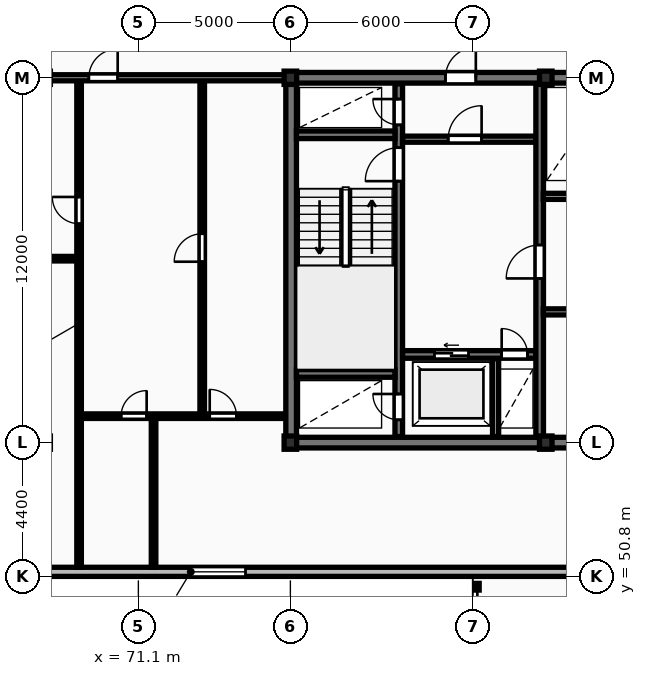
"""IFC4 building model, lengths in metres.
Left out: names, types, materials, properties, quantities, classifications, styles, units other than length and angle.
Written with IfcOpenShell. Run it as: python <this file> out.ifc"""

import sys

from ifc_helpers import new_model, si_unit, direction, frame, frame_2d, origin, origin_2d, place, context, subcontext, project, spatial, rectangle, i_section, extrude, element, fill, save


model = new_model("IFC4")
c1 = context("Model", 3, precision=1e-05, world=origin(), true_north=direction((0.0, 1.0)))
c2 = subcontext(c1, "Body", "Model", "MODEL_VIEW")
j1 = project(units=[si_unit("LENGTHUNIT", "METRE"), si_unit("PLANEANGLEUNIT", "RADIAN")], contexts=[c1])
p1 = place(None, origin())
s1 = spatial("IfcSite", under=j1, at=p1, CompositionType="ELEMENT")
p2 = place(p1, origin())
s2 = spatial("IfcBuilding", under=s1, at=p2, CompositionType="ELEMENT")
p3 = place(p2, frame((0.0, 0.0, 139.3)))
s3 = spatial("IfcBuildingStorey", under=s2, at=p3, CompositionType="ELEMENT", Elevation=139.3)
for number, where, z_axis, x_axis in (
    (1, (76.1, 55.2, 0.0), (0.0, 0.0, 1.0), (1.0, 0.0, 0.0)),
    (2, (76.1, 67.2, 0.0), (0.0, 0.0, 1.0), (1.0, 0.0, 0.0)),
    (3, (84.5, 55.2, 0.0), (0.0, 0.0, 1.0), (1.0, 0.0, 0.0)),
    (4, (84.5, 67.2, 0.0), (0.0, 0.0, 1.0), (1.0, 0.0, 0.0)),
):
    element("IfcColumn", number, at=place(p3, frame(where, z_axis=z_axis, x_axis=x_axis)), inside=s3, PredefinedType="COLUMN", context=c2, shape_type="SweptSolid", body=[
        extrude(i_section(OverallWidth=0.412, OverallDepth=0.437, WebThickness=0.036, FlangeThickness=0.052, FilletRadius=0.015, at=origin_2d()), origin(), (0.0, 0.0, 1.0), 3.6),
    ])
p4 = place(p3, frame((57.6, 50.95, 0.0), z_axis=(0.0, 0.0, 1.0), x_axis=(1.0, 0.0, 0.0)))
e5 = element("IfcWall", 5, at=p4, inside=s3, PredefinedType="STANDARD", context=c2, shape_type="SweptSolid", body=[
    extrude(rectangle(XDim=73.0, YDim=0.3, at=frame_2d((36.5, 0.0))), origin(), (0.0, 0.0, 1.0), 3.31),
])
p5 = place(p4, frame((15.225, 0.0, 0.85)))
e6 = element("IfcOpeningElement", 6, at=p5, cuts=e5, PredefinedType="OPENING", context=c2, shape_type="SweptSolid", body=[
    extrude(rectangle(XDim=1.8, YDim=1.8, at=frame_2d((0.9, 0.9))), frame((0.0, 0.16, 0.0), z_axis=(0.0, -1.0, 0.0), x_axis=(1.0, 0.0, 0.0)), (0.0, 0.0, 1.0), 0.32),
])
p6 = place(p4, frame((58.575, 0.0, 0.85)))
e7 = element("IfcOpeningElement", 7, at=p6, cuts=e5, PredefinedType="OPENING", context=c2, shape_type="SweptSolid", body=[
    extrude(rectangle(XDim=1.8, YDim=1.8, at=frame_2d((0.9, 0.9))), frame((0.0, 0.16, 0.0), z_axis=(0.0, -1.0, 0.0), x_axis=(1.0, 0.0, 0.0)), (0.0, 0.0, 1.0), 0.32),
])
p7 = place(p4, frame((33.45, 0.0, 0.0)))
e8 = element("IfcOpeningElement", 8, at=p7, cuts=e5, PredefinedType="OPENING", context=c2, shape_type="SweptSolid", body=[
    extrude(rectangle(XDim=1.1, YDim=2.1, at=frame_2d((0.55, 1.05))), frame((0.0, 0.16, 0.0), z_axis=(0.0, -1.0, 0.0), x_axis=(1.0, 0.0, 0.0)), (0.0, 0.0, 1.0), 0.32),
])
p8 = place(p3, frame((75.95, 55.2, 0.0), z_axis=(0.0, 0.0, 1.0), x_axis=(1.0, 0.0, 0.0)))
e9 = element("IfcWall", 9, at=p8, inside=s3, PredefinedType="SHEAR", context=c2, shape_type="SweptSolid", body=[
    extrude(rectangle(XDim=36.3, YDim=0.35, at=frame_2d((18.15, 0.0))), origin(), (0.0, 0.0, 1.0), 3.6),
])
p9 = place(p8, frame((15.1, 0.0, 0.0)))
e10 = element("IfcOpeningElement", 10, at=p9, cuts=e9, PredefinedType="OPENING", context=c2, shape_type="SweptSolid", body=[
    extrude(rectangle(XDim=1.1, YDim=2.1, at=frame_2d((0.55, 1.05))), frame((0.0, 0.185, 0.0), z_axis=(0.0, -1.0, 0.0), x_axis=(1.0, 0.0, 0.0)), (0.0, 0.0, 1.0), 0.37),
])
p10 = place(p3, frame((76.125, 55.375, 0.0), z_axis=(0.0, 0.0, 1.0), x_axis=(0.0, 1.0, 0.0)))
e11 = element("IfcWall", 11, at=p10, inside=s3, PredefinedType="SHEAR", context=c2, shape_type="SweptSolid", body=[
    extrude(rectangle(XDim=11.65, YDim=0.35, at=frame_2d((5.825, 0.0))), origin(), (0.0, 0.0, 1.0), 3.6),
])
p11 = place(p3, frame((75.95, 67.2, 0.0), z_axis=(0.0, 0.0, 1.0), x_axis=(1.0, 0.0, 0.0)))
e12 = element("IfcWall", 12, at=p11, inside=s3, PredefinedType="SHEAR", context=c2, shape_type="SweptSolid", body=[
    extrude(rectangle(XDim=36.3, YDim=0.35, at=frame_2d((18.15, 0.0))), origin(), (0.0, 0.0, 1.0), 3.6),
])
p12 = place(p11, frame((5.25, 0.0, 0.0)))
e13 = element("IfcOpeningElement", 13, at=p12, cuts=e12, PredefinedType="OPENING", context=c2, shape_type="SweptSolid", body=[
    extrude(rectangle(XDim=1.0, YDim=2.15, at=frame_2d((0.5, 1.075))), frame((0.0, 0.185, 0.0), z_axis=(0.0, -1.0, 0.0), x_axis=(1.0, 0.0, 0.0)), (0.0, 0.0, 1.0), 0.37),
])
p13 = place(p11, frame((21.6, 0.0, 0.0)))
e14 = element("IfcOpeningElement", 14, at=p13, cuts=e12, PredefinedType="OPENING", context=c2, shape_type="SweptSolid", body=[
    extrude(rectangle(XDim=1.5, YDim=2.2, at=frame_2d((0.75, 1.1))), frame((0.0, 0.185, 0.0), z_axis=(0.0, -1.0, 0.0), x_axis=(1.0, 0.0, 0.0)), (0.0, 0.0, 1.0), 0.37),
])
p14 = place(p11, frame((30.45, 0.0, 0.0)))
e15 = element("IfcOpeningElement", 15, at=p14, cuts=e12, PredefinedType="OPENING", context=c2, shape_type="SweptSolid", body=[
    extrude(rectangle(XDim=1.0, YDim=2.15, at=frame_2d((0.5, 1.075))), frame((0.0, 0.185, 0.0), z_axis=(0.0, -1.0, 0.0), x_axis=(1.0, 0.0, 0.0)), (0.0, 0.0, 1.0), 0.37),
])
p15 = place(p3, frame((79.665, 55.4, 0.0), z_axis=(0.0, 0.0, 1.0), x_axis=(0.0, 1.0, 0.0)))
e16 = element("IfcWall", 16, at=p15, inside=s3, PredefinedType="SHEAR", context=c2, shape_type="SweptSolid", body=[
    extrude(rectangle(XDim=11.6, YDim=0.25, at=frame_2d((5.8, 0.0))), origin(), (0.0, 0.0, 1.0), 3.6),
])
p16 = place(p15, frame((0.55, 0.0, 0.0)))
e17 = element("IfcOpeningElement", 17, at=p16, cuts=e16, PredefinedType="OPENING", context=c2, shape_type="SweptSolid", body=[
    extrude(rectangle(XDim=0.85, YDim=2.05, at=frame_2d((0.425, 1.025))), frame((0.0, 0.135, 0.0), z_axis=(0.0, -1.0, 0.0), x_axis=(1.0, 0.0, 0.0)), (0.0, 0.0, 1.0), 0.27),
])
p17 = place(p15, frame((8.4, 0.0, 0.0)))
e18 = element("IfcOpeningElement", 18, at=p17, cuts=e16, PredefinedType="OPENING", context=c2, shape_type="SweptSolid", body=[
    extrude(rectangle(XDim=1.1, YDim=2.1, at=frame_2d((0.55, 1.05))), frame((0.0, 0.135, 0.0), z_axis=(0.0, -1.0, 0.0), x_axis=(1.0, 0.0, 0.0)), (0.0, 0.0, 1.0), 0.27),
])
p18 = place(p15, frame((10.25, 0.0, 0.0)))
e19 = element("IfcOpeningElement", 19, at=p18, cuts=e16, PredefinedType="OPENING", context=c2, shape_type="SweptSolid", body=[
    extrude(rectangle(XDim=0.85, YDim=2.05, at=frame_2d((0.425, 1.025))), frame((0.0, 0.135, 0.0), z_axis=(0.0, -1.0, 0.0), x_axis=(1.0, 0.0, 0.0)), (0.0, 0.0, 1.0), 0.27),
])
for number, where, z_axis, x_axis in (
    (20, (76.3, 57.475, 0.0), (0.0, 0.0, 1.0), (1.0, 0.0, 0.0)),
    (21, (76.3, 65.325, 0.0), (0.0, 0.0, 1.0), (1.0, 0.0, 0.0)),
):
    element("IfcWall", number, at=place(p3, frame(where, z_axis=z_axis, x_axis=x_axis)), inside=s3, PredefinedType="SHEAR", context=c2, shape_type="SweptSolid", body=[
        extrude(rectangle(XDim=3.24, YDim=0.25, at=frame_2d((1.62, 0.0))), origin(), (0.0, 0.0, 1.0), 3.6),
    ])
p19 = place(p3, frame((79.79, 58.1, 0.0), z_axis=(0.0, 0.0, 1.0), x_axis=(1.0, 0.0, 0.0)))
e22 = element("IfcWall", 22, at=p19, inside=s3, PredefinedType="SHEAR", context=c2, shape_type="SweptSolid", body=[
    extrude(rectangle(XDim=4.39, YDim=0.25, at=frame_2d((2.195, 0.0))), origin(), (0.0, 0.0, 1.0), 3.6),
])
p20 = place(p19, frame((1.05, 0.0, 0.0)))
e23 = element("IfcOpeningElement", 23, at=p20, cuts=e22, PredefinedType="OPENING", context=c2, shape_type="SweptSolid", body=[
    extrude(rectangle(XDim=1.12, YDim=2.12, at=frame_2d((0.56, 1.06))), frame((0.0, 0.135, 0.0), z_axis=(0.0, -1.0, 0.0), x_axis=(1.0, 0.0, 0.0)), (0.0, 0.0, 1.0), 0.27),
])
p21 = place(p19, frame((3.26, 0.0, 0.0)))
e24 = element("IfcOpeningElement", 24, at=p21, cuts=e22, PredefinedType="OPENING", context=c2, shape_type="SweptSolid", body=[
    extrude(rectangle(XDim=0.85, YDim=2.05, at=frame_2d((0.425, 1.025))), frame((0.0, 0.135, 0.0), z_axis=(0.0, -1.0, 0.0), x_axis=(1.0, 0.0, 0.0)), (0.0, 0.0, 1.0), 0.27),
])
p22 = place(p3, frame((82.85, 55.4, 0.0), z_axis=(0.0, 0.0, 1.0), x_axis=(0.0, 1.0, 0.0)))
e25 = element("IfcWall", 25, at=p22, inside=s3, PredefinedType="PARTITIONING", context=c2, shape_type="SweptSolid", body=[
    extrude(rectangle(XDim=2.56, YDim=0.2, at=frame_2d((1.28, 0.0))), origin(), (0.0, 0.0, 1.0), 3.31),
])
p23 = place(p3, frame((79.79, 65.18, 0.0), z_axis=(0.0, 0.0, 1.0), x_axis=(1.0, 0.0, 0.0)))
e26 = element("IfcWall", 26, at=p23, inside=s3, PredefinedType="PARTITIONING", context=c2, shape_type="SweptSolid", body=[
    extrude(rectangle(XDim=4.39, YDim=0.2, at=frame_2d((2.195, 0.0))), origin(), (0.0, 0.0, 1.0), 3.31),
])
p24 = place(p23, frame((1.5, 0.0, 0.0)))
e27 = element("IfcOpeningElement", 27, at=p24, cuts=e26, PredefinedType="OPENING", context=c2, shape_type="SweptSolid", body=[
    extrude(rectangle(XDim=1.1, YDim=2.1, at=frame_2d((0.55, 1.05))), frame((0.0, 0.11, 0.0), z_axis=(0.0, -1.0, 0.0), x_axis=(1.0, 0.0, 0.0)), (0.0, 0.0, 1.0), 0.22),
])
p25 = place(p3, frame((84.3, 55.4, 0.0), z_axis=(0.0, 0.0, 1.0), x_axis=(0.0, 1.0, 0.0)))
e28 = element("IfcWall", 28, at=p25, inside=s3, PredefinedType="SHEAR", context=c2, shape_type="SweptSolid", body=[
    extrude(rectangle(XDim=11.6, YDim=0.25, at=frame_2d((5.8, 0.0))), origin(), (0.0, 0.0, 1.0), 3.6),
])
p26 = place(p25, frame((5.2, 0.0, 0.0)))
e29 = element("IfcOpeningElement", 29, at=p26, cuts=e28, PredefinedType="OPENING", context=c2, shape_type="SweptSolid", body=[
    extrude(rectangle(XDim=1.1, YDim=2.1, at=frame_2d((0.55, 1.05))), frame((0.0, 0.135, 0.0), z_axis=(0.0, -1.0, 0.0), x_axis=(1.0, 0.0, 0.0)), (0.0, 0.0, 1.0), 0.27),
])
p27 = place(p3, frame((84.42, 59.5, 0.0), z_axis=(0.0, 0.0, 1.0), x_axis=(1.0, 0.0, 0.0)))
e30 = element("IfcWall", 30, at=p27, inside=s3, PredefinedType="PARTITIONING", context=c2, shape_type="SweptSolid", body=[
    extrude(rectangle(XDim=8.36, YDim=0.2, at=frame_2d((4.18, 0.0))), origin(), (0.0, 0.0, 1.0), 3.31),
])
p28 = place(p27, frame((2.1, 0.0, 0.0)))
e31 = element("IfcOpeningElement", 31, at=p28, cuts=e30, PredefinedType="OPENING", context=c2, shape_type="SweptSolid", body=[
    extrude(rectangle(XDim=0.92, YDim=2.08, at=frame_2d((0.46, 1.04))), frame((0.0, 0.11, 0.0), z_axis=(0.0, -1.0, 0.0), x_axis=(1.0, 0.0, 0.0)), (0.0, 0.0, 1.0), 0.22),
])
p29 = place(p27, frame((6.38, 0.0, 0.0)))
e32 = element("IfcOpeningElement", 32, at=p29, cuts=e30, PredefinedType="OPENING", context=c2, shape_type="SweptSolid", body=[
    extrude(rectangle(XDim=1.1, YDim=2.1, at=frame_2d((0.55, 1.05))), frame((0.0, 0.11, 0.0), z_axis=(0.0, -1.0, 0.0), x_axis=(1.0, 0.0, 0.0)), (0.0, 0.0, 1.0), 0.22),
])
p30 = place(p3, frame((84.42, 63.3, 0.0), z_axis=(0.0, 0.0, 1.0), x_axis=(1.0, 0.0, 0.0)))
e33 = element("IfcWall", 33, at=p30, inside=s3, PredefinedType="PARTITIONING", context=c2, shape_type="SweptSolid", body=[
    extrude(rectangle(XDim=19.83, YDim=0.2, at=frame_2d((9.915, 0.0))), origin(), (0.0, 0.0, 1.0), 3.31),
])
p31 = place(p30, frame((1.15, 0.0, 0.0)))
e34 = element("IfcOpeningElement", 34, at=p31, cuts=e33, PredefinedType="OPENING", context=c2, shape_type="SweptSolid", body=[
    extrude(rectangle(XDim=0.85, YDim=2.05, at=frame_2d((0.425, 1.025))), frame((0.0, 0.11, 0.0), z_axis=(0.0, -1.0, 0.0), x_axis=(1.0, 0.0, 0.0)), (0.0, 0.0, 1.0), 0.22),
])
p32 = place(p30, frame((3.25, 0.0, 0.0)))
e35 = element("IfcOpeningElement", 35, at=p32, cuts=e33, PredefinedType="OPENING", context=c2, shape_type="SweptSolid", body=[
    extrude(rectangle(XDim=0.85, YDim=2.05, at=frame_2d((0.425, 1.025))), frame((0.0, 0.11, 0.0), z_axis=(0.0, -1.0, 0.0), x_axis=(1.0, 0.0, 0.0)), (0.0, 0.0, 1.0), 0.22),
])
p33 = place(p30, frame((13.08, 0.0, 0.0)))
e36 = element("IfcOpeningElement", 36, at=p33, cuts=e33, PredefinedType="OPENING", context=c2, shape_type="SweptSolid", body=[
    extrude(rectangle(XDim=1.5, YDim=2.2, at=frame_2d((0.75, 1.1))), frame((0.0, 0.11, 0.0), z_axis=(0.0, -1.0, 0.0), x_axis=(1.0, 0.0, 0.0)), (0.0, 0.0, 1.0), 0.22),
])
p34 = place(p30, frame((5.53, 0.0, 0.0)))
e37 = element("IfcOpeningElement", 37, at=p34, cuts=e33, PredefinedType="OPENING", context=c2, shape_type="SweptSolid", body=[
    extrude(rectangle(XDim=0.88, YDim=2.06, at=frame_2d((0.44, 1.03))), frame((0.0, 0.11, 0.0), z_axis=(0.0, -1.0, 0.0), x_axis=(1.0, 0.0, 0.0)), (0.0, 0.0, 1.0), 0.22),
])
p35 = place(p30, frame((7.68, 0.0, 0.0)))
e38 = element("IfcOpeningElement", 38, at=p35, cuts=e33, PredefinedType="OPENING", context=c2, shape_type="SweptSolid", body=[
    extrude(rectangle(XDim=0.88, YDim=2.06, at=frame_2d((0.44, 1.03))), frame((0.0, 0.11, 0.0), z_axis=(0.0, -1.0, 0.0), x_axis=(1.0, 0.0, 0.0)), (0.0, 0.0, 1.0), 0.22),
])
p36 = place(p30, frame((10.43, 0.0, 0.0)))
e39 = element("IfcOpeningElement", 39, at=p36, cuts=e33, PredefinedType="OPENING", context=c2, shape_type="SweptSolid", body=[
    extrude(rectangle(XDim=0.85, YDim=2.05, at=frame_2d((0.425, 1.025))), frame((0.0, 0.11, 0.0), z_axis=(0.0, -1.0, 0.0), x_axis=(1.0, 0.0, 0.0)), (0.0, 0.0, 1.0), 0.22),
])
p37 = place(p30, frame((16.23, 0.0, 0.0)))
e40 = element("IfcOpeningElement", 40, at=p37, cuts=e33, PredefinedType="OPENING", context=c2, shape_type="SweptSolid", body=[
    extrude(rectangle(XDim=0.96, YDim=2.1, at=frame_2d((0.48, 1.05))), frame((0.0, 0.11, 0.0), z_axis=(0.0, -1.0, 0.0), x_axis=(1.0, 0.0, 0.0)), (0.0, 0.0, 1.0), 0.22),
])
p38 = place(p30, frame((18.68, 0.0, 0.0)))
e41 = element("IfcOpeningElement", 41, at=p38, cuts=e33, PredefinedType="OPENING", context=c2, shape_type="SweptSolid", body=[
    extrude(rectangle(XDim=0.84, YDim=2.04, at=frame_2d((0.42, 1.02))), frame((0.0, 0.11, 0.0), z_axis=(0.0, -1.0, 0.0), x_axis=(1.0, 0.0, 0.0)), (0.0, 0.0, 1.0), 0.22),
])
p39 = place(p3, frame((57.6, 61.25, 0.0), z_axis=(0.0, 0.0, 1.0), x_axis=(1.0, 0.0, 0.0)))
e42 = element("IfcWall", 42, at=p39, inside=s3, PredefinedType="PARTITIONING", context=c2, shape_type="SweptSolid", body=[
    extrude(rectangle(XDim=11.55, YDim=0.15, at=frame_2d((5.775, 0.0))), origin(), (0.0, 0.0, 1.0), 3.31),
])
p40 = place(p39, frame((5.355, 0.0, 0.0)))
e43 = element("IfcOpeningElement", 43, at=p40, cuts=e42, PredefinedType="OPENING", context=c2, shape_type="SweptSolid", body=[
    extrude(rectangle(XDim=0.84, YDim=2.04, at=frame_2d((0.42, 1.02))), frame((0.0, 0.085, 0.0), z_axis=(0.0, -1.0, 0.0), x_axis=(1.0, 0.0, 0.0)), (0.0, 0.0, 1.0), 0.17),
])
p41 = place(p3, frame((69.15, 51.1, 0.0), z_axis=(0.0, 0.0, 1.0), x_axis=(0.0, 1.0, 0.0)))
e44 = element("IfcWall", 44, at=p41, inside=s3, PredefinedType="PARTITIONING", context=c2, shape_type="SweptSolid", body=[
    extrude(rectangle(XDim=16.05, YDim=0.15, at=frame_2d((8.025, 0.0))), origin(), (0.0, 0.0, 1.0), 3.31),
])
p42 = place(p41, frame((11.3, 0.0, 0.0)))
e45 = element("IfcOpeningElement", 45, at=p42, cuts=e44, PredefinedType="OPENING", context=c2, shape_type="SweptSolid", body=[
    extrude(rectangle(XDim=0.88, YDim=2.06, at=frame_2d((0.44, 1.03))), frame((0.0, 0.085, 0.0), z_axis=(0.0, -1.0, 0.0), x_axis=(1.0, 0.0, 0.0)), (0.0, 0.0, 1.0), 0.17),
])
p43 = place(p3, frame((73.2, 56.07, 0.0), z_axis=(0.0, 0.0, 1.0), x_axis=(0.0, 1.0, 0.0)))
e46 = element("IfcWall", 46, at=p43, inside=s3, PredefinedType="PARTITIONING", context=c2, shape_type="SweptSolid", body=[
    extrude(rectangle(XDim=11.08, YDim=0.15, at=frame_2d((5.54, 0.0))), origin(), (0.0, 0.0, 1.0), 3.31),
])
p44 = place(p43, frame((5.08, 0.0, 0.0)))
e47 = element("IfcOpeningElement", 47, at=p44, cuts=e46, PredefinedType="OPENING", context=c2, shape_type="SweptSolid", body=[
    extrude(rectangle(XDim=0.92, YDim=2.08, at=frame_2d((0.46, 1.04))), frame((0.0, 0.085, 0.0), z_axis=(0.0, -1.0, 0.0), x_axis=(1.0, 0.0, 0.0)), (0.0, 0.0, 1.0), 0.17),
])
p45 = place(p3, frame((71.6, 51.1, 0.0), z_axis=(0.0, 0.0, 1.0), x_axis=(0.0, 1.0, 0.0)))
e48 = element("IfcWall", 48, at=p45, inside=s3, PredefinedType="PARTITIONING", context=c2, shape_type="SweptSolid", body=[
    extrude(rectangle(XDim=4.97, YDim=0.15, at=frame_2d((2.485, 0.0))), origin(), (0.0, 0.0, 1.0), 3.31),
])
p46 = place(p3, frame((69.17, 56.07, 0.0), z_axis=(0.0, 0.0, 1.0), x_axis=(1.0, 0.0, 0.0)))
e49 = element("IfcWall", 49, at=p46, inside=s3, PredefinedType="PARTITIONING", context=c2, shape_type="SweptSolid", body=[
    extrude(rectangle(XDim=6.76, YDim=0.15, at=frame_2d((3.38, 0.0))), origin(), (0.0, 0.0, 1.0), 3.31),
])
p47 = place(p46, frame((1.362, 0.0, 0.0)))
e50 = element("IfcOpeningElement", 50, at=p47, cuts=e49, PredefinedType="OPENING", context=c2, shape_type="SweptSolid", body=[
    extrude(rectangle(XDim=0.84, YDim=2.04, at=frame_2d((0.42, 1.02))), frame((0.0, 0.085, 0.0), z_axis=(0.0, -1.0, 0.0), x_axis=(1.0, 0.0, 0.0)), (0.0, 0.0, 1.0), 0.17),
])
p48 = place(p46, frame((4.277, 0.0, 0.0)))
e51 = element("IfcOpeningElement", 51, at=p48, cuts=e49, PredefinedType="OPENING", context=c2, shape_type="SweptSolid", body=[
    extrude(rectangle(XDim=0.88, YDim=2.06, at=frame_2d((0.44, 1.03))), frame((0.0, 0.085, 0.0), z_axis=(0.0, -1.0, 0.0), x_axis=(1.0, 0.0, 0.0)), (0.0, 0.0, 1.0), 0.17),
])
p49 = place(p3, frame((57.6, 67.2, 0.0), z_axis=(0.0, 0.0, 1.0), x_axis=(1.0, 0.0, 0.0)))
e52 = element("IfcWall", 52, at=p49, inside=s3, PredefinedType="PARTITIONING", context=c2, shape_type="SweptSolid", body=[
    extrude(rectangle(XDim=18.35, YDim=0.2, at=frame_2d((9.175, 0.0))), origin(), (0.0, 0.0, 1.0), 2.773),
])
p50 = place(p49, frame((11.87, 0.0, 0.0)))
e53 = element("IfcOpeningElement", 53, at=p50, cuts=e52, PredefinedType="OPENING", context=c2, shape_type="SweptSolid", body=[
    extrude(rectangle(XDim=0.95, YDim=2.15, at=frame_2d((0.475, 1.075))), frame((0.0, 0.11, 0.0), z_axis=(0.0, -1.0, 0.0), x_axis=(1.0, 0.0, 0.0)), (0.0, 0.0, 1.0), 0.22),
])
p51 = place(p5, origin())
e54 = element("IfcWindow", 54, at=p51, inside=s3, PartitioningType="SINGLE_PANEL", PredefinedType="WINDOW", context=c2, shape_type="SweptSolid", body=[
    extrude(rectangle(XDim=1.8, YDim=1.8, at=frame_2d((0.9, 0.9))), frame((0.0, 0.03, 0.0), z_axis=(0.0, -1.0, 0.0), x_axis=(1.0, 0.0, 0.0)), (0.0, 0.0, 1.0), 0.06),
])
fill(e6, e54)
p52 = place(p12, origin())
e55 = element("IfcDoor", 55, at=p52, inside=s3, OperationType="SINGLE_SWING_RIGHT", PredefinedType="DOOR", context=c2, shape_type="SweptSolid", body=[
    extrude(rectangle(XDim=1.0, YDim=2.15, at=frame_2d((0.5, 1.075))), frame((0.0, 0.025, 0.0), z_axis=(0.0, -1.0, 0.0), x_axis=(1.0, 0.0, 0.0)), (0.0, 0.0, 1.0), 0.05),
])
fill(e13, e55)
p53 = place(p16, origin())
e56 = element("IfcDoor", 56, at=p53, inside=s3, OperationType="SINGLE_SWING_RIGHT", PredefinedType="DOOR", context=c2, shape_type="SweptSolid", body=[
    extrude(rectangle(XDim=0.85, YDim=2.05, at=frame_2d((0.425, 1.025))), frame((0.0, 0.025, 0.0), z_axis=(0.0, -1.0, 0.0), x_axis=(1.0, 0.0, 0.0)), (0.0, 0.0, 1.0), 0.05),
])
fill(e17, e56)
p54 = place(p17, origin())
e57 = element("IfcDoor", 57, at=p54, inside=s3, OperationType="SINGLE_SWING_LEFT", PredefinedType="DOOR", context=c2, shape_type="SweptSolid", body=[
    extrude(rectangle(XDim=1.1, YDim=2.1, at=frame_2d((0.55, 1.05))), frame((0.0, 0.025, 0.0), z_axis=(0.0, -1.0, 0.0), x_axis=(1.0, 0.0, 0.0)), (0.0, 0.0, 1.0), 0.05),
])
fill(e18, e57)
p55 = place(p18, origin())
e58 = element("IfcDoor", 58, at=p55, inside=s3, OperationType="SINGLE_SWING_RIGHT", PredefinedType="DOOR", context=c2, shape_type="SweptSolid", body=[
    extrude(rectangle(XDim=0.85, YDim=2.05, at=frame_2d((0.425, 1.025))), frame((0.0, 0.025, 0.0), z_axis=(0.0, -1.0, 0.0), x_axis=(1.0, 0.0, 0.0)), (0.0, 0.0, 1.0), 0.05),
])
fill(e19, e58)
p56 = place(p20, origin())
e59 = element("IfcDoor", 59, at=p56, inside=s3, OperationType="SLIDING_TO_LEFT", PredefinedType="DOOR", context=c2, shape_type="SweptSolid", body=[
    extrude(rectangle(XDim=1.12, YDim=2.12, at=frame_2d((0.56, 1.06))), frame((0.0, 0.025, 0.0), z_axis=(0.0, -1.0, 0.0), x_axis=(1.0, 0.0, 0.0)), (0.0, 0.0, 1.0), 0.05),
])
fill(e23, e59)
p57 = place(p21, origin())
e60 = element("IfcDoor", 60, at=p57, inside=s3, OperationType="SINGLE_SWING_LEFT", PredefinedType="DOOR", context=c2, shape_type="SweptSolid", body=[
    extrude(rectangle(XDim=0.85, YDim=2.05, at=frame_2d((0.425, 1.025))), frame((0.0, 0.025, 0.0), z_axis=(0.0, -1.0, 0.0), x_axis=(1.0, 0.0, 0.0)), (0.0, 0.0, 1.0), 0.05),
])
fill(e24, e60)
p58 = place(p24, origin())
e61 = element("IfcDoor", 61, at=p58, inside=s3, OperationType="SINGLE_SWING_RIGHT", PredefinedType="DOOR", context=c2, shape_type="SweptSolid", body=[
    extrude(rectangle(XDim=1.1, YDim=2.1, at=frame_2d((0.55, 1.05))), frame((0.0, 0.025, 0.0), z_axis=(0.0, -1.0, 0.0), x_axis=(1.0, 0.0, 0.0)), (0.0, 0.0, 1.0), 0.05),
])
fill(e27, e61)
p59 = place(p26, origin())
e62 = element("IfcDoor", 62, at=p59, inside=s3, OperationType="SINGLE_SWING_LEFT", PredefinedType="DOOR", context=c2, shape_type="SweptSolid", body=[
    extrude(rectangle(XDim=1.1, YDim=2.1, at=frame_2d((0.55, 1.05))), frame((0.0, 0.025, 0.0), z_axis=(0.0, -1.0, 0.0), x_axis=(1.0, 0.0, 0.0)), (0.0, 0.0, 1.0), 0.05),
])
fill(e29, e62)
p60 = place(p42, origin())
e63 = element("IfcDoor", 63, at=p60, inside=s3, OperationType="SINGLE_SWING_RIGHT", PredefinedType="DOOR", context=c2, shape_type="SweptSolid", body=[
    extrude(rectangle(XDim=0.88, YDim=2.06, at=frame_2d((0.44, 1.03))), frame((0.0, 0.025, 0.0), z_axis=(0.0, -1.0, 0.0), x_axis=(1.0, 0.0, 0.0)), (0.0, 0.0, 1.0), 0.05),
])
fill(e45, e63)
p61 = place(p44, origin())
e64 = element("IfcDoor", 64, at=p61, inside=s3, OperationType="SINGLE_SWING_LEFT", PredefinedType="DOOR", context=c2, shape_type="SweptSolid", body=[
    extrude(rectangle(XDim=0.92, YDim=2.08, at=frame_2d((0.46, 1.04))), frame((0.0, 0.025, 0.0), z_axis=(0.0, -1.0, 0.0), x_axis=(1.0, 0.0, 0.0)), (0.0, 0.0, 1.0), 0.05),
])
fill(e47, e64)
p62 = place(p47, origin())
e65 = element("IfcDoor", 65, at=p62, inside=s3, OperationType="SINGLE_SWING_RIGHT", PredefinedType="DOOR", context=c2, shape_type="SweptSolid", body=[
    extrude(rectangle(XDim=0.84, YDim=2.04, at=frame_2d((0.42, 1.02))), frame((0.0, 0.025, 0.0), z_axis=(0.0, -1.0, 0.0), x_axis=(1.0, 0.0, 0.0)), (0.0, 0.0, 1.0), 0.05),
])
fill(e50, e65)
p63 = place(p48, origin())
e66 = element("IfcDoor", 66, at=p63, inside=s3, OperationType="SINGLE_SWING_LEFT", PredefinedType="DOOR", context=c2, shape_type="SweptSolid", body=[
    extrude(rectangle(XDim=0.88, YDim=2.06, at=frame_2d((0.44, 1.03))), frame((0.0, 0.025, 0.0), z_axis=(0.0, -1.0, 0.0), x_axis=(1.0, 0.0, 0.0)), (0.0, 0.0, 1.0), 0.05),
])
fill(e51, e66)
p64 = place(p50, origin())
e67 = element("IfcDoor", 67, at=p64, inside=s3, OperationType="SINGLE_SWING_RIGHT", PredefinedType="DOOR", context=c2, shape_type="SweptSolid", body=[
    extrude(rectangle(XDim=0.95, YDim=2.15, at=frame_2d((0.475, 1.075))), frame((0.0, 0.025, 0.0), z_axis=(0.0, -1.0, 0.0), x_axis=(1.0, 0.0, 0.0)), (0.0, 0.0, 1.0), 0.05),
])
fill(e53, e67)
save(model, sys.argv[1])
